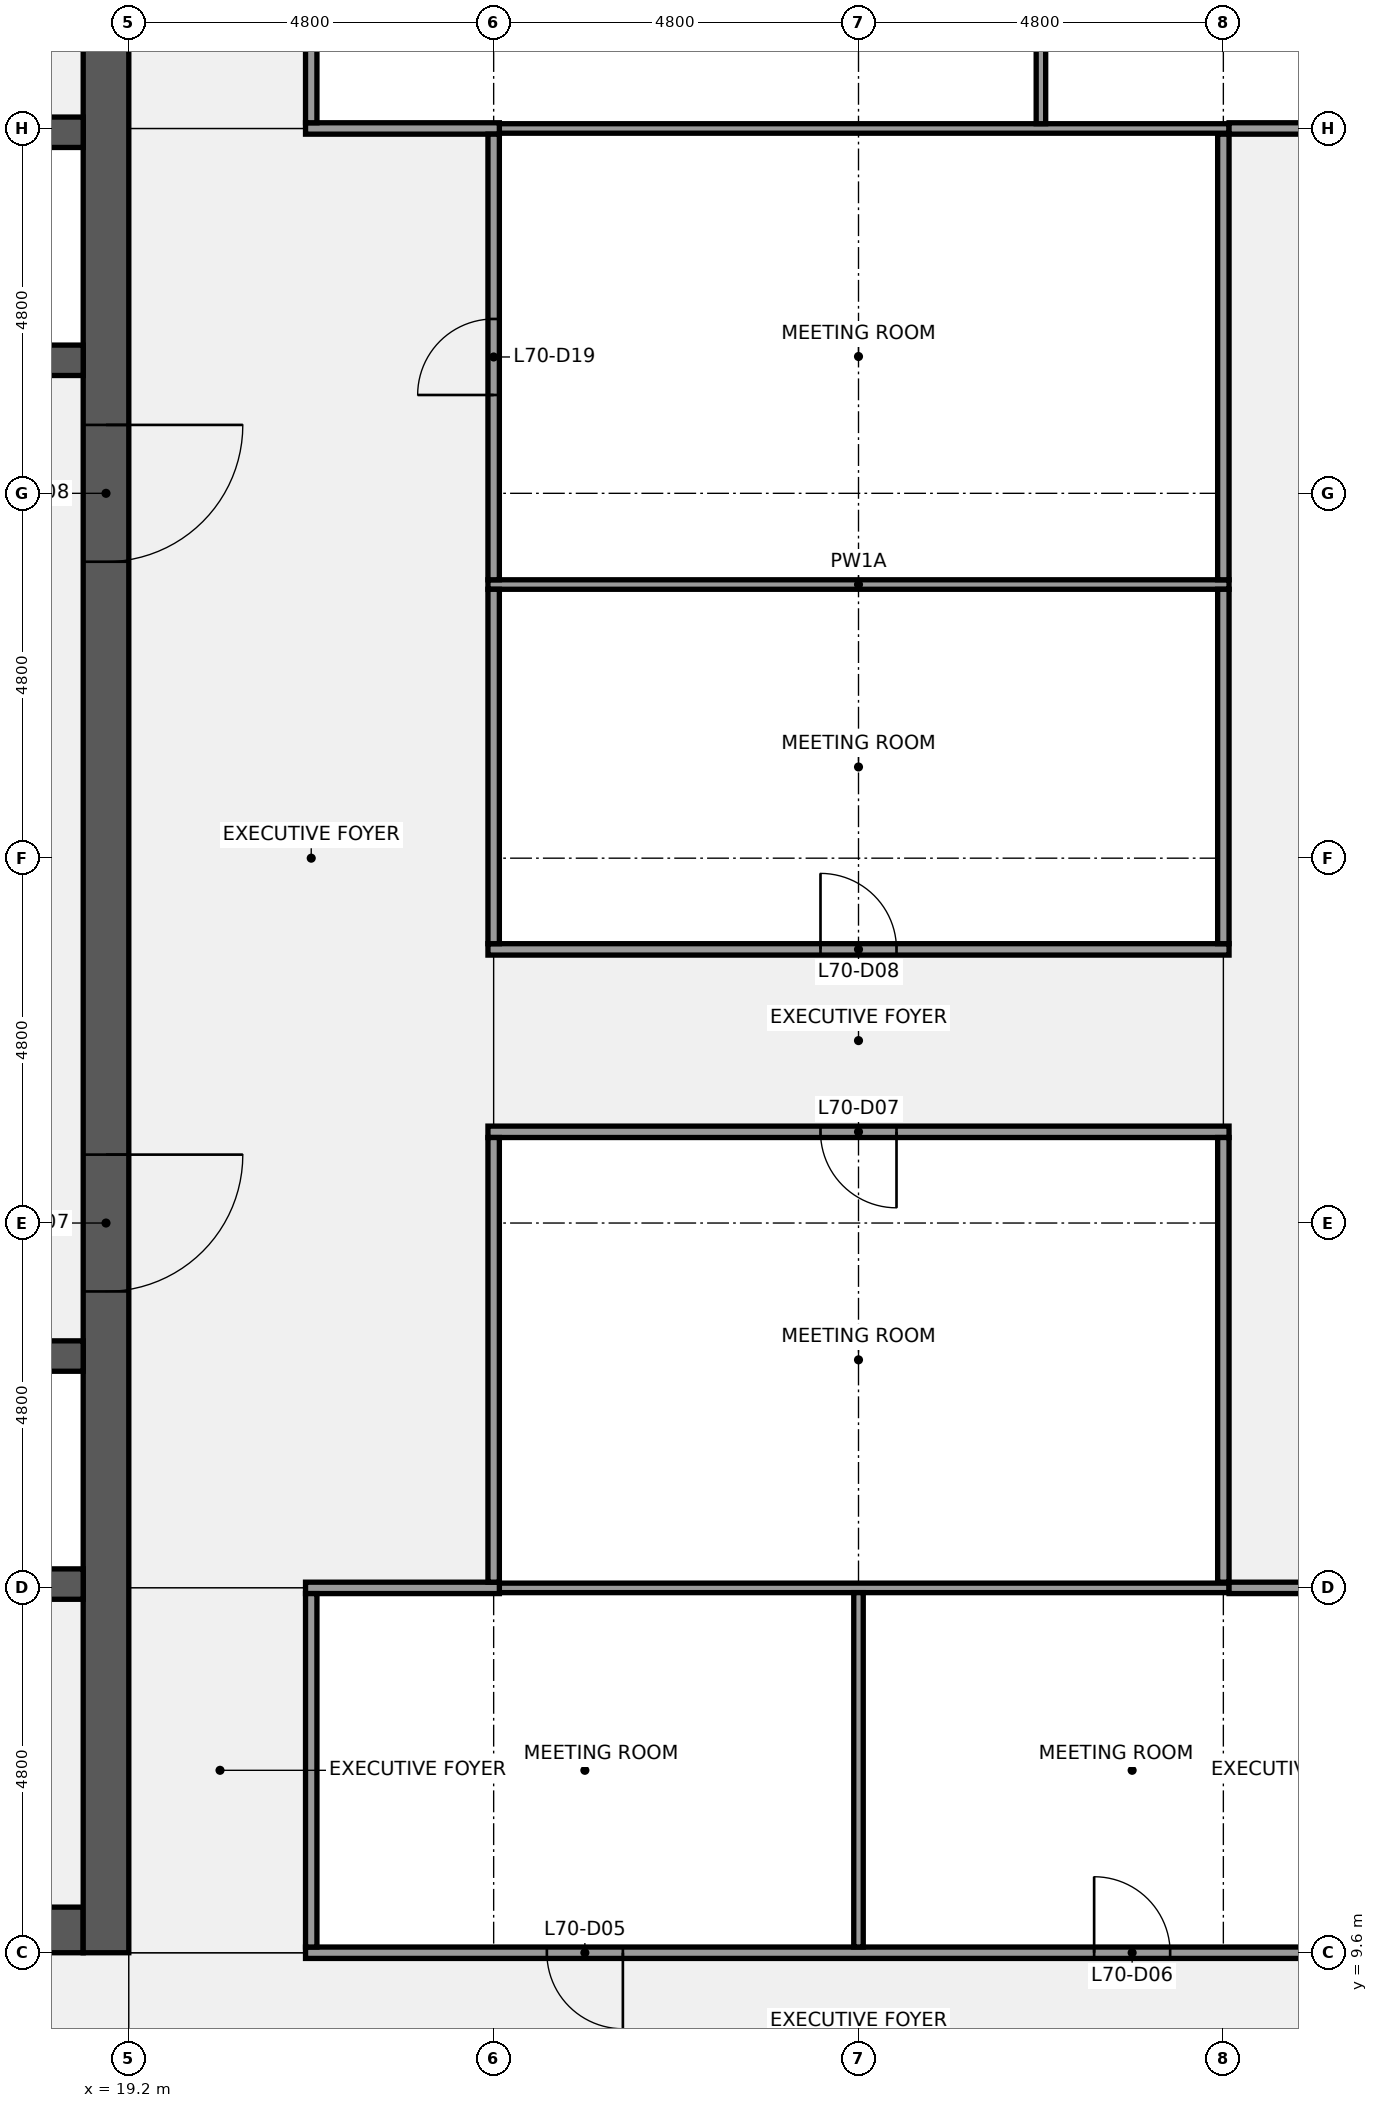
"""IFC4 building model, lengths in metres.
Left out: names, types, materials, properties, quantities, classifications, styles, units other than length and angle.
Written with IfcOpenShell. Run it as: python <this file> out.ifc"""

import sys

from ifc_helpers import new_model, si_unit, direction, frame, frame_2d, origin, place, context, subcontext, project, spatial, rectangle, extrude, element, fill, save


model = new_model("IFC4")
c1 = context("Model", 3, precision=1e-05, world=origin(), true_north=direction((0.0, 1.0)))
c2 = subcontext(c1, "Body", "Model", "MODEL_VIEW")
j1 = project(units=[si_unit("LENGTHUNIT", "METRE"), si_unit("PLANEANGLEUNIT", "RADIAN")], contexts=[c1])
p1 = place(None, origin())
s1 = spatial("IfcSite", under=j1, at=p1, CompositionType="ELEMENT")
p2 = place(p1, origin())
s2 = spatial("IfcBuilding", under=s1, at=p2, CompositionType="ELEMENT")
p3 = place(p2, frame((0.0, 0.0, 318.3)))
s3 = spatial("IfcBuildingStorey", under=s2, at=p3, CompositionType="ELEMENT", Elevation=318.3)
p4 = place(p3, frame((18.6, 9.9, 0.0), z_axis=(0.0, 0.0, 1.0), x_axis=(-1.0, 0.0, 0.0)))
e1 = element("IfcWall", 1, at=p4, inside=s3, PredefinedType="SHEAR", context=c2, shape_type="SweptSolid", body=[
    extrude(rectangle(XDim=4.2, YDim=0.6, at=frame_2d((2.1, 0.0))), origin(), (0.0, 0.0, 1.0), 3.84),
])
p5 = place(p4, frame((1.25, 0.0, 0.0)))
e2 = element("IfcOpeningElement", 2, at=p5, cuts=e1, PredefinedType="OPENING", context=c2, shape_type="SweptSolid", body=[
    extrude(rectangle(XDim=1.1, YDim=2.1, at=frame_2d((0.55, 1.05))), frame((0.0, 0.31, 0.0), z_axis=(0.0, -1.0, 0.0), x_axis=(1.0, 0.0, 0.0)), (0.0, 0.0, 1.0), 0.62),
])
p6 = place(p3, frame((18.9, 38.4, 0.0), z_axis=(0.0, 0.0, 1.0), x_axis=(0.0, -1.0, 0.0)))
e3 = element("IfcWall", 3, at=p6, inside=s3, PredefinedType="SHEAR", context=c2, shape_type="SweptSolid", body=[
    extrude(rectangle(XDim=28.8, YDim=0.6, at=frame_2d((14.4, 0.0))), origin(), (0.0, 0.0, 1.0), 3.84),
])
p7 = place(p6, frame((18.3, 0.0, 0.0)))
e4 = element("IfcOpeningElement", 4, at=p7, cuts=e3, PredefinedType="OPENING", context=c2, shape_type="SweptSolid", body=[
    extrude(rectangle(XDim=1.8, YDim=2.1, at=frame_2d((0.9, 1.05))), frame((0.0, 0.31, 0.0), z_axis=(0.0, -1.0, 0.0), x_axis=(1.0, 0.0, 0.0)), (0.0, 0.0, 1.0), 0.62),
])
p8 = place(p6, frame((8.7, 0.0, 0.0)))
e5 = element("IfcOpeningElement", 5, at=p8, cuts=e3, PredefinedType="OPENING", context=c2, shape_type="SweptSolid", body=[
    extrude(rectangle(XDim=1.8, YDim=2.1, at=frame_2d((0.9, 1.05))), frame((0.0, 0.31, 0.0), z_axis=(0.0, -1.0, 0.0), x_axis=(1.0, 0.0, 0.0)), (0.0, 0.0, 1.0), 0.62),
])
p9 = place(p3, frame((0.6, 14.45, 0.0), z_axis=(0.0, 0.0, 1.0), x_axis=(1.0, 0.0, 0.0)))
e6 = element("IfcWall", 6, at=p9, inside=s3, PredefinedType="SHEAR", context=c2, shape_type="SweptSolid", body=[
    extrude(rectangle(XDim=18.0, YDim=0.4, at=frame_2d((9.0, 0.0))), origin(), (0.0, 0.0, 1.0), 3.84),
])
p10 = place(p3, frame((0.6, 17.45, 0.0), z_axis=(0.0, 0.0, 1.0), x_axis=(1.0, 0.0, 0.0)))
e7 = element("IfcWall", 7, at=p10, inside=s3, PredefinedType="SHEAR", context=c2, shape_type="SweptSolid", body=[
    extrude(rectangle(XDim=18.0, YDim=0.4, at=frame_2d((9.0, 0.0))), origin(), (0.0, 0.0, 1.0), 3.84),
])
p11 = place(p10, frame((2.163, 0.0, 0.0)))
e8 = element("IfcOpeningElement", 8, at=p11, cuts=e7, PredefinedType="OPENING", context=c2, shape_type="SweptSolid", body=[
    extrude(rectangle(XDim=1.0, YDim=2.1, at=frame_2d((0.5, 1.05))), frame((0.0, 0.21, 0.0), z_axis=(0.0, -1.0, 0.0), x_axis=(1.0, 0.0, 0.0)), (0.0, 0.0, 1.0), 0.42),
])
p12 = place(p10, frame((6.1, 0.0, 0.0)))
e9 = element("IfcOpeningElement", 9, at=p12, cuts=e7, PredefinedType="OPENING", context=c2, shape_type="SweptSolid", body=[
    extrude(rectangle(XDim=1.0, YDim=2.1, at=frame_2d((0.5, 1.05))), frame((0.0, 0.21, 0.0), z_axis=(0.0, -1.0, 0.0), x_axis=(1.0, 0.0, 0.0)), (0.0, 0.0, 1.0), 0.42),
])
p13 = place(p10, frame((8.5, 0.0, 0.0)))
e10 = element("IfcOpeningElement", 10, at=p13, cuts=e7, PredefinedType="OPENING", context=c2, shape_type="SweptSolid", body=[
    extrude(rectangle(XDim=1.0, YDim=2.1, at=frame_2d((0.5, 1.05))), frame((0.0, 0.21, 0.0), z_axis=(0.0, -1.0, 0.0), x_axis=(1.0, 0.0, 0.0)), (0.0, 0.0, 1.0), 0.42),
])
p14 = place(p10, frame((13.637, 0.0, 0.0)))
e11 = element("IfcOpeningElement", 11, at=p14, cuts=e7, PredefinedType="OPENING", context=c2, shape_type="SweptSolid", body=[
    extrude(rectangle(XDim=1.0, YDim=2.1, at=frame_2d((0.5, 1.05))), frame((0.0, 0.21, 0.0), z_axis=(0.0, -1.0, 0.0), x_axis=(1.0, 0.0, 0.0)), (0.0, 0.0, 1.0), 0.42),
])
p15 = place(p3, frame((0.6, 30.55, 0.0), z_axis=(0.0, 0.0, 1.0), x_axis=(1.0, 0.0, 0.0)))
e12 = element("IfcWall", 12, at=p15, inside=s3, PredefinedType="SHEAR", context=c2, shape_type="SweptSolid", body=[
    extrude(rectangle(XDim=18.0, YDim=0.4, at=frame_2d((9.0, 0.0))), origin(), (0.0, 0.0, 1.0), 3.84),
])
p16 = place(p15, frame((1.6, 0.0, 0.0)))
e13 = element("IfcOpeningElement", 13, at=p16, cuts=e12, PredefinedType="OPENING", context=c2, shape_type="SweptSolid", body=[
    extrude(rectangle(XDim=1.2, YDim=2.1, at=frame_2d((0.6, 1.05))), frame((0.0, 0.21, 0.0), z_axis=(0.0, -1.0, 0.0), x_axis=(1.0, 0.0, 0.0)), (0.0, 0.0, 1.0), 0.42),
])
p17 = place(p15, frame((4.2, 0.0, 0.0)))
e14 = element("IfcOpeningElement", 14, at=p17, cuts=e12, PredefinedType="OPENING", context=c2, shape_type="SweptSolid", body=[
    extrude(rectangle(XDim=1.2, YDim=2.1, at=frame_2d((0.6, 1.05))), frame((0.0, 0.21, 0.0), z_axis=(0.0, -1.0, 0.0), x_axis=(1.0, 0.0, 0.0)), (0.0, 0.0, 1.0), 0.42),
])
p18 = place(p15, frame((6.8, 0.0, 0.0)))
e15 = element("IfcOpeningElement", 15, at=p18, cuts=e12, PredefinedType="OPENING", context=c2, shape_type="SweptSolid", body=[
    extrude(rectangle(XDim=1.2, YDim=2.1, at=frame_2d((0.6, 1.05))), frame((0.0, 0.21, 0.0), z_axis=(0.0, -1.0, 0.0), x_axis=(1.0, 0.0, 0.0)), (0.0, 0.0, 1.0), 0.42),
])
p19 = place(p15, frame((10.0, 0.0, 0.0)))
e16 = element("IfcOpeningElement", 16, at=p19, cuts=e12, PredefinedType="OPENING", context=c2, shape_type="SweptSolid", body=[
    extrude(rectangle(XDim=1.2, YDim=2.1, at=frame_2d((0.6, 1.05))), frame((0.0, 0.21, 0.0), z_axis=(0.0, -1.0, 0.0), x_axis=(1.0, 0.0, 0.0)), (0.0, 0.0, 1.0), 0.42),
])
p20 = place(p15, frame((12.6, 0.0, 0.0)))
e17 = element("IfcOpeningElement", 17, at=p20, cuts=e12, PredefinedType="OPENING", context=c2, shape_type="SweptSolid", body=[
    extrude(rectangle(XDim=1.2, YDim=2.1, at=frame_2d((0.6, 1.05))), frame((0.0, 0.21, 0.0), z_axis=(0.0, -1.0, 0.0), x_axis=(1.0, 0.0, 0.0)), (0.0, 0.0, 1.0), 0.42),
])
p21 = place(p15, frame((15.2, 0.0, 0.0)))
e18 = element("IfcOpeningElement", 18, at=p21, cuts=e12, PredefinedType="OPENING", context=c2, shape_type="SweptSolid", body=[
    extrude(rectangle(XDim=1.2, YDim=2.1, at=frame_2d((0.6, 1.05))), frame((0.0, 0.21, 0.0), z_axis=(0.0, -1.0, 0.0), x_axis=(1.0, 0.0, 0.0)), (0.0, 0.0, 1.0), 0.42),
])
p22 = place(p3, frame((0.6, 33.55, 0.0), z_axis=(0.0, 0.0, 1.0), x_axis=(1.0, 0.0, 0.0)))
e19 = element("IfcWall", 19, at=p22, inside=s3, PredefinedType="SHEAR", context=c2, shape_type="SweptSolid", body=[
    extrude(rectangle(XDim=18.0, YDim=0.4, at=frame_2d((9.0, 0.0))), origin(), (0.0, 0.0, 1.0), 3.84),
])
p23 = place(p3, frame((21.525, 9.6, 0.0), z_axis=(0.0, 0.0, 1.0), x_axis=(1.0, 0.0, 0.0)))
e20 = element("IfcWall", 20, at=p23, inside=s3, PredefinedType="PARTITIONING", context=c2, shape_type="SweptSolid", body=[
    extrude(rectangle(XDim=14.55, YDim=0.15, at=frame_2d((7.275, 0.0))), origin(), (0.0, 0.0, 1.0), 2.87),
])
p24 = place(p23, frame((3.175, 0.0, 0.0)))
e21 = element("IfcOpeningElement", 21, at=p24, cuts=e20, PredefinedType="OPENING", context=c2, shape_type="SweptSolid", body=[
    extrude(rectangle(XDim=1.0, YDim=2.1, at=frame_2d((0.5, 1.05))), frame((0.0, 0.085, 0.0), z_axis=(0.0, -1.0, 0.0), x_axis=(1.0, 0.0, 0.0)), (0.0, 0.0, 1.0), 0.17),
])
p25 = place(p23, frame((10.375, 0.0, 0.0)))
e22 = element("IfcOpeningElement", 22, at=p25, cuts=e20, PredefinedType="OPENING", context=c2, shape_type="SweptSolid", body=[
    extrude(rectangle(XDim=1.0, YDim=2.1, at=frame_2d((0.5, 1.05))), frame((0.0, 0.085, 0.0), z_axis=(0.0, -1.0, 0.0), x_axis=(1.0, 0.0, 0.0)), (0.0, 0.0, 1.0), 0.17),
])
p26 = place(p3, frame((24.075, 14.4, 0.0), z_axis=(0.0, 0.0, 1.0), x_axis=(1.0, 0.0, 0.0)))
e23 = element("IfcWall", 23, at=p26, inside=s3, PredefinedType="PARTITIONING", context=c2, shape_type="SweptSolid", body=[
    extrude(rectangle(XDim=9.6, YDim=0.125, at=frame_2d((4.8, 0.0))), origin(), (0.0, 0.0, 1.0), 2.87),
])
p27 = place(p3, frame((21.525, 14.4, 0.0), z_axis=(0.0, 0.0, 1.0), x_axis=(1.0, 0.0, 0.0)))
e24 = element("IfcWall", 24, at=p27, inside=s3, PredefinedType="PARTITIONING", context=c2, shape_type="SweptSolid", body=[
    extrude(rectangle(XDim=2.55, YDim=0.15, at=frame_2d((1.275, 0.0))), origin(), (0.0, 0.0, 1.0), 2.87),
])
p28 = place(p3, frame((33.675, 14.4, 0.0), z_axis=(0.0, 0.0, 1.0), x_axis=(1.0, 0.0, 0.0)))
e25 = element("IfcWall", 25, at=p28, inside=s3, PredefinedType="PARTITIONING", context=c2, shape_type="SweptSolid", body=[
    extrude(rectangle(XDim=2.4, YDim=0.15, at=frame_2d((1.2, 0.0))), origin(), (0.0, 0.0, 1.0), 2.87),
])
p29 = place(p3, frame((23.925, 20.4, 0.0), z_axis=(0.0, 0.0, 1.0), x_axis=(1.0, 0.0, 0.0)))
e26 = element("IfcWall", 26, at=p29, inside=s3, PredefinedType="PARTITIONING", context=c2, shape_type="SweptSolid", body=[
    extrude(rectangle(XDim=9.75, YDim=0.15, at=frame_2d((4.875, 0.0))), origin(), (0.0, 0.0, 1.0), 2.87),
])
p30 = place(p29, frame((4.375, 0.0, 0.0)))
e27 = element("IfcOpeningElement", 27, at=p30, cuts=e26, PredefinedType="OPENING", context=c2, shape_type="SweptSolid", body=[
    extrude(rectangle(XDim=1.0, YDim=2.1, at=frame_2d((0.5, 1.05))), frame((0.0, 0.085, 0.0), z_axis=(0.0, -1.0, 0.0), x_axis=(1.0, 0.0, 0.0)), (0.0, 0.0, 1.0), 0.17),
])
p31 = place(p3, frame((23.925, 22.8, 0.0), z_axis=(0.0, 0.0, 1.0), x_axis=(1.0, 0.0, 0.0)))
e28 = element("IfcWall", 28, at=p31, inside=s3, PredefinedType="PARTITIONING", context=c2, shape_type="SweptSolid", body=[
    extrude(rectangle(XDim=9.75, YDim=0.15, at=frame_2d((4.875, 0.0))), origin(), (0.0, 0.0, 1.0), 2.87),
])
p32 = place(p31, frame((4.375, 0.0, 0.0)))
e29 = element("IfcOpeningElement", 29, at=p32, cuts=e28, PredefinedType="OPENING", context=c2, shape_type="SweptSolid", body=[
    extrude(rectangle(XDim=1.0, YDim=2.1, at=frame_2d((0.5, 1.05))), frame((0.0, 0.085, 0.0), z_axis=(0.0, -1.0, 0.0), x_axis=(1.0, 0.0, 0.0)), (0.0, 0.0, 1.0), 0.17),
])
p33 = place(p3, frame((23.925, 27.6, 0.0), z_axis=(0.0, 0.0, 1.0), x_axis=(1.0, 0.0, 0.0)))
e30 = element("IfcWall", 30, at=p33, inside=s3, PredefinedType="PARTITIONING", context=c2, shape_type="SweptSolid", body=[
    extrude(rectangle(XDim=9.75, YDim=0.125, at=frame_2d((4.875, 0.0))), origin(), (0.0, 0.0, 1.0), 2.87),
])
p34 = place(p3, frame((24.075, 33.6, 0.0), z_axis=(0.0, 0.0, 1.0), x_axis=(1.0, 0.0, 0.0)))
e31 = element("IfcWall", 31, at=p34, inside=s3, PredefinedType="PARTITIONING", context=c2, shape_type="SweptSolid", body=[
    extrude(rectangle(XDim=9.6, YDim=0.125, at=frame_2d((4.8, 0.0))), origin(), (0.0, 0.0, 1.0), 2.87),
])
p35 = place(p3, frame((21.525, 33.6, 0.0), z_axis=(0.0, 0.0, 1.0), x_axis=(1.0, 0.0, 0.0)))
e32 = element("IfcWall", 32, at=p35, inside=s3, PredefinedType="PARTITIONING", context=c2, shape_type="SweptSolid", body=[
    extrude(rectangle(XDim=2.55, YDim=0.15, at=frame_2d((1.275, 0.0))), origin(), (0.0, 0.0, 1.0), 2.87),
])
p36 = place(p3, frame((33.675, 33.6, 0.0), z_axis=(0.0, 0.0, 1.0), x_axis=(1.0, 0.0, 0.0)))
e33 = element("IfcWall", 33, at=p36, inside=s3, PredefinedType="PARTITIONING", context=c2, shape_type="SweptSolid", body=[
    extrude(rectangle(XDim=2.4, YDim=0.15, at=frame_2d((1.2, 0.0))), origin(), (0.0, 0.0, 1.0), 2.87),
])
for number, where, z_axis, x_axis in (
    (34, (21.6, 9.675, 0.0), (0.0, 0.0, 1.0), (0.0, 1.0, 0.0)),
    (35, (21.6, 33.675, 0.0), (0.0, 0.0, 1.0), (0.0, 1.0, 0.0)),
):
    element("IfcWall", number, at=place(p3, frame(where, z_axis=z_axis, x_axis=x_axis)), inside=s3, PredefinedType="PARTITIONING", context=c2, shape_type="SweptSolid", body=[
        extrude(rectangle(XDim=4.65, YDim=0.15, at=frame_2d((2.325, 0.0))), origin(), (0.0, 0.0, 1.0), 2.87),
    ])
p37 = place(p3, frame((24.0, 14.475, 0.0), z_axis=(0.0, 0.0, 1.0), x_axis=(0.0, 1.0, 0.0)))
e36 = element("IfcWall", 36, at=p37, inside=s3, PredefinedType="PARTITIONING", context=c2, shape_type="SweptSolid", body=[
    extrude(rectangle(XDim=5.85, YDim=0.15, at=frame_2d((2.925, 0.0))), origin(), (0.0, 0.0, 1.0), 2.87),
])
p38 = place(p3, frame((24.0, 22.875, 0.0), z_axis=(0.0, 0.0, 1.0), x_axis=(0.0, 1.0, 0.0)))
e37 = element("IfcWall", 37, at=p38, inside=s3, PredefinedType="PARTITIONING", context=c2, shape_type="SweptSolid", body=[
    extrude(rectangle(XDim=4.663, YDim=0.15, at=frame_2d((2.331, 0.0))), origin(), (0.0, 0.0, 1.0), 2.87),
])
p39 = place(p3, frame((24.0, 27.663, 0.0), z_axis=(0.0, 0.0, 1.0), x_axis=(0.0, 1.0, 0.0)))
e38 = element("IfcWall", 38, at=p39, inside=s3, PredefinedType="PARTITIONING", context=c2, shape_type="SweptSolid", body=[
    extrude(rectangle(XDim=5.862, YDim=0.15, at=frame_2d((2.931, 0.0))), origin(), (0.0, 0.0, 1.0), 2.87),
])
p40 = place(p39, frame((2.431, 0.0, 0.0)))
e39 = element("IfcOpeningElement", 39, at=p40, cuts=e38, PredefinedType="OPENING", context=c2, shape_type="SweptSolid", body=[
    extrude(rectangle(XDim=1.0, YDim=2.1, at=frame_2d((0.5, 1.05))), frame((0.0, 0.085, 0.0), z_axis=(0.0, -1.0, 0.0), x_axis=(1.0, 0.0, 0.0)), (0.0, 0.0, 1.0), 0.17),
])
for number, where, z_axis, x_axis in (
    (40, (28.8, 9.675, 0.0), (0.0, 0.0, 1.0), (0.0, 1.0, 0.0)),
    (41, (31.2, 33.663, 0.0), (0.0, 0.0, 1.0), (0.0, 1.0, 0.0)),
):
    element("IfcWall", number, at=place(p3, frame(where, z_axis=z_axis, x_axis=x_axis)), inside=s3, PredefinedType="PARTITIONING", context=c2, shape_type="SweptSolid", body=[
        extrude(rectangle(XDim=4.662, YDim=0.125, at=frame_2d((2.331, 0.0))), origin(), (0.0, 0.0, 1.0), 2.87),
    ])
p41 = place(p3, frame((33.6, 14.475, 0.0), z_axis=(0.0, 0.0, 1.0), x_axis=(0.0, 1.0, 0.0)))
e42 = element("IfcWall", 42, at=p41, inside=s3, PredefinedType="PARTITIONING", context=c2, shape_type="SweptSolid", body=[
    extrude(rectangle(XDim=5.85, YDim=0.15, at=frame_2d((2.925, 0.0))), origin(), (0.0, 0.0, 1.0), 2.87),
])
p42 = place(p3, frame((33.6, 22.875, 0.0), z_axis=(0.0, 0.0, 1.0), x_axis=(0.0, 1.0, 0.0)))
e43 = element("IfcWall", 43, at=p42, inside=s3, PredefinedType="PARTITIONING", context=c2, shape_type="SweptSolid", body=[
    extrude(rectangle(XDim=4.663, YDim=0.15, at=frame_2d((2.331, 0.0))), origin(), (0.0, 0.0, 1.0), 2.87),
])
p43 = place(p3, frame((33.6, 27.663, 0.0), z_axis=(0.0, 0.0, 1.0), x_axis=(0.0, 1.0, 0.0)))
e44 = element("IfcWall", 44, at=p43, inside=s3, PredefinedType="PARTITIONING", context=c2, shape_type="SweptSolid", body=[
    extrude(rectangle(XDim=5.862, YDim=0.15, at=frame_2d((2.931, 0.0))), origin(), (0.0, 0.0, 1.0), 2.87),
])
p44 = place(p7, origin())
e45 = element("IfcDoor", 45, at=p44, inside=s3, OperationType="DOUBLE_DOOR_SINGLE_SWING", PredefinedType="DOOR", context=c2, shape_type="SweptSolid", body=[
    extrude(rectangle(XDim=1.8, YDim=2.1, at=frame_2d((0.9, 1.05))), frame((0.0, 0.025, 0.0), z_axis=(0.0, -1.0, 0.0), x_axis=(1.0, 0.0, 0.0)), (0.0, 0.0, 1.0), 0.05),
])
fill(e4, e45)
p45 = place(p8, origin())
e46 = element("IfcDoor", 46, at=p45, inside=s3, OperationType="DOUBLE_DOOR_SINGLE_SWING", PredefinedType="DOOR", context=c2, shape_type="SweptSolid", body=[
    extrude(rectangle(XDim=1.8, YDim=2.1, at=frame_2d((0.9, 1.05))), frame((0.0, 0.025, 0.0), z_axis=(0.0, -1.0, 0.0), x_axis=(1.0, 0.0, 0.0)), (0.0, 0.0, 1.0), 0.05),
])
fill(e5, e46)
p46 = place(p24, origin())
e47 = element("IfcDoor", 47, at=p46, inside=s3, OperationType="SINGLE_SWING_RIGHT", PredefinedType="DOOR", context=c2, shape_type="SweptSolid", body=[
    extrude(rectangle(XDim=1.0, YDim=2.1, at=frame_2d((0.5, 1.05))), frame((0.0, 0.025, 0.0), z_axis=(0.0, -1.0, 0.0), x_axis=(1.0, 0.0, 0.0)), (0.0, 0.0, 1.0), 0.05),
])
fill(e21, e47)
p47 = place(p25, origin())
e48 = element("IfcDoor", 48, at=p47, inside=s3, OperationType="SINGLE_SWING_LEFT", PredefinedType="DOOR", context=c2, shape_type="SweptSolid", body=[
    extrude(rectangle(XDim=1.0, YDim=2.1, at=frame_2d((0.5, 1.05))), frame((0.0, 0.025, 0.0), z_axis=(0.0, -1.0, 0.0), x_axis=(1.0, 0.0, 0.0)), (0.0, 0.0, 1.0), 0.05),
])
fill(e22, e48)
p48 = place(p30, origin())
e49 = element("IfcDoor", 49, at=p48, inside=s3, OperationType="SINGLE_SWING_RIGHT", PredefinedType="DOOR", context=c2, shape_type="SweptSolid", body=[
    extrude(rectangle(XDim=1.0, YDim=2.1, at=frame_2d((0.5, 1.05))), frame((0.0, 0.025, 0.0), z_axis=(0.0, -1.0, 0.0), x_axis=(1.0, 0.0, 0.0)), (0.0, 0.0, 1.0), 0.05),
])
fill(e27, e49)
p49 = place(p32, origin())
e50 = element("IfcDoor", 50, at=p49, inside=s3, OperationType="SINGLE_SWING_LEFT", PredefinedType="DOOR", context=c2, shape_type="SweptSolid", body=[
    extrude(rectangle(XDim=1.0, YDim=2.1, at=frame_2d((0.5, 1.05))), frame((0.0, 0.025, 0.0), z_axis=(0.0, -1.0, 0.0), x_axis=(1.0, 0.0, 0.0)), (0.0, 0.0, 1.0), 0.05),
])
fill(e29, e50)
p50 = place(p40, origin())
e51 = element("IfcDoor", 51, at=p50, inside=s3, OperationType="SINGLE_SWING_LEFT", PredefinedType="DOOR", context=c2, shape_type="SweptSolid", body=[
    extrude(rectangle(XDim=1.0, YDim=2.1, at=frame_2d((0.5, 1.05))), frame((0.0, 0.025, 0.0), z_axis=(0.0, -1.0, 0.0), x_axis=(1.0, 0.0, 0.0)), (0.0, 0.0, 1.0), 0.05),
])
fill(e39, e51)
save(model, sys.argv[1])
